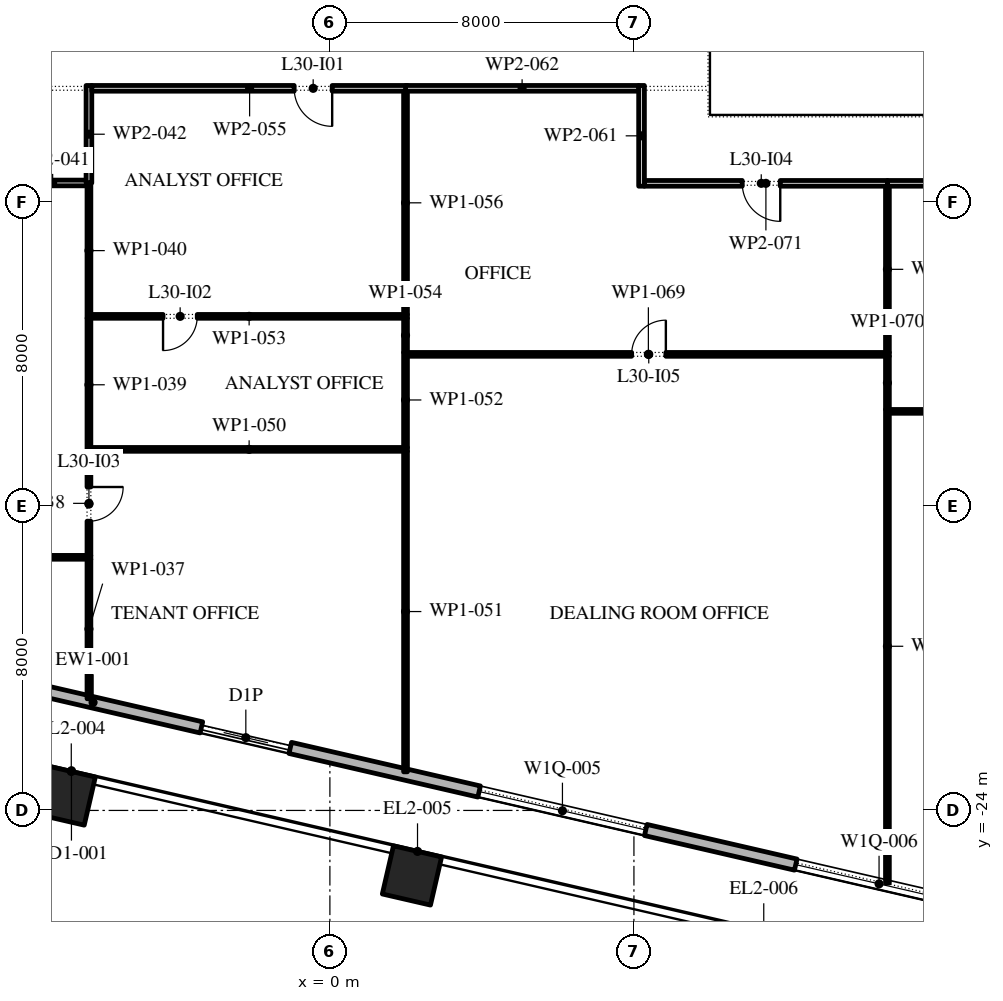
"""IFC4 building model, lengths in metres.
Left out: names, types, materials, properties, quantities, classifications, styles, units other than length and angle.
Written with IfcOpenShell. Run it as: python <this file> out.ifc"""

import sys

from ifc_helpers import new_model, si_unit, direction, frame, frame_2d, origin, origin_2d, place, context, subcontext, project, spatial, rectangle, extrude, element, fill, save


model = new_model("IFC4")
c1 = context("Model", 3, precision=1e-05, world=origin(), true_north=direction((0.0, 1.0)))
c2 = subcontext(c1, "Body", "Model", "MODEL_VIEW")
j1 = project(units=[si_unit("LENGTHUNIT", "METRE"), si_unit("PLANEANGLEUNIT", "RADIAN")], contexts=[c1])
p1 = place(None, origin())
s1 = spatial("IfcSite", under=j1, at=p1, CompositionType="ELEMENT")
p2 = place(p1, origin())
s2 = spatial("IfcBuilding", under=s1, at=p2, CompositionType="ELEMENT")
p3 = place(p2, frame((0.0, 0.0, 139.2)))
s3 = spatial("IfcBuildingStorey", under=s2, at=p3, CompositionType="ELEMENT", Elevation=139.2)
for number, where, z_axis, x_axis in (
    (1, (-6.951, -23.608, 0.0), (0.0, 0.0, 1.0), (0.974, -0.225, 0.0)),
    (2, (2.159, -25.711, 0.0), (0.0, 0.0, 1.0), (0.974, -0.225, 0.0)),
):
    element("IfcColumn", number, at=place(p3, frame(where, z_axis=z_axis, x_axis=x_axis)), inside=s3, PredefinedType="COLUMN", context=c2, shape_type="SweptSolid", body=[
        extrude(rectangle(XDim=1.3, YDim=1.3, at=origin_2d()), origin(), (0.0, 0.0, 1.0), 4.2),
    ])
p4 = place(p3, frame((-31.078, -15.421, 0.0), z_axis=(0.0, 0.0, 1.0), x_axis=(0.974370456532, -0.224949357493, 0.0)))
e3 = element("IfcWall", 3, at=p4, inside=s3, PredefinedType="STANDARD", context=c2, shape_type="SweptSolid", body=[
    extrude(rectangle(XDim=51.0, YDim=0.3, at=frame_2d((25.5, 0.0))), origin(), (0.0, 0.0, 1.0), 4.0),
])
p5 = place(p4, frame((1.875, 0.0, 0.45)))
e4 = element("IfcOpeningElement", 4, at=p5, cuts=e3, PredefinedType="OPENING", context=c2, shape_type="SweptSolid", body=[
    extrude(rectangle(XDim=4.5, YDim=2.65, at=frame_2d((2.25, 1.325))), frame((0.0, 0.16, 0.0), z_axis=(0.0, -1.0, 0.0), x_axis=(1.0, 0.0, 0.0)), (0.0, 0.0, 1.0), 0.32),
])
p6 = place(p4, frame((10.275, 0.0, 0.45)))
e5 = element("IfcOpeningElement", 5, at=p6, cuts=e3, PredefinedType="OPENING", context=c2, shape_type="SweptSolid", body=[
    extrude(rectangle(XDim=4.5, YDim=2.525, at=frame_2d((2.25, 1.262))), frame((0.0, 0.16, 0.0), z_axis=(0.0, -1.0, 0.0), x_axis=(1.0, 0.0, 0.0)), (0.0, 0.0, 1.0), 0.32),
])
p7 = place(p4, frame((18.825, 0.0, 0.45)))
e6 = element("IfcOpeningElement", 6, at=p7, cuts=e3, PredefinedType="OPENING", context=c2, shape_type="SweptSolid", body=[
    extrude(rectangle(XDim=4.5, YDim=2.5, at=frame_2d((2.25, 1.25))), frame((0.0, 0.16, 0.0), z_axis=(0.0, -1.0, 0.0), x_axis=(1.0, 0.0, 0.0)), (0.0, 0.0, 1.0), 0.32),
])
p8 = place(p4, frame((28.425, 0.0, 0.0)))
e7 = element("IfcOpeningElement", 7, at=p8, cuts=e3, PredefinedType="OPENING", context=c2, shape_type="SweptSolid", body=[
    extrude(rectangle(XDim=2.4, YDim=2.9, at=frame_2d((1.2, 1.45))), frame((0.0, 0.16, 0.0), z_axis=(0.0, -1.0, 0.0), x_axis=(1.0, 0.0, 0.0)), (0.0, 0.0, 1.0), 0.32),
])
p9 = place(p4, frame((35.925, 0.0, 0.45)))
e8 = element("IfcOpeningElement", 8, at=p9, cuts=e3, PredefinedType="OPENING", context=c2, shape_type="SweptSolid", body=[
    extrude(rectangle(XDim=4.5, YDim=2.45, at=frame_2d((2.25, 1.225))), frame((0.0, 0.16, 0.0), z_axis=(0.0, -1.0, 0.0), x_axis=(1.0, 0.0, 0.0)), (0.0, 0.0, 1.0), 0.32),
])
p10 = place(p4, frame((44.475, 0.0, 0.45)))
e9 = element("IfcOpeningElement", 9, at=p10, cuts=e3, PredefinedType="OPENING", context=c2, shape_type="SweptSolid", body=[
    extrude(rectangle(XDim=4.5, YDim=2.45, at=frame_2d((2.25, 1.225))), frame((0.0, 0.16, 0.0), z_axis=(0.0, -1.0, 0.0), x_axis=(1.0, 0.0, 0.0)), (0.0, 0.0, 1.0), 0.32),
])
p11 = place(p3, frame((-13.5, -17.34, 0.0), z_axis=(0.0, 0.0, 1.0), x_axis=(1.0, 0.0, 0.0)))
e10 = element("IfcWall", 10, at=p11, inside=s3, PredefinedType="PARTITIONING", context=c2, shape_type="SweptSolid", body=[
    extrude(rectangle(XDim=7.21, YDim=0.1, at=frame_2d((3.605, 0.0))), origin(), (0.0, 0.0, 1.0), 4.0),
])
p12 = place(p11, frame((1.7, 0.0, 0.0)))
e11 = element("IfcOpeningElement", 11, at=p12, cuts=e10, PredefinedType="OPENING", context=c2, shape_type="SweptSolid", body=[
    extrude(rectangle(XDim=0.9, YDim=2.1, at=frame_2d((0.45, 1.05))), frame((0.0, 0.06, 0.0), z_axis=(0.0, -1.0, 0.0), x_axis=(1.0, 0.0, 0.0)), (0.0, 0.0, 1.0), 0.12),
])
p13 = place(p3, frame((-6.34, -21.061, 0.0), z_axis=(0.0, 0.0, 1.0), x_axis=(0.0, 1.0, 0.0)))
e12 = element("IfcWall", 12, at=p13, inside=s3, PredefinedType="PARTITIONING", context=c2, shape_type="SweptSolid", body=[
    extrude(rectangle(XDim=3.671, YDim=0.1, at=frame_2d((1.835, 0.0))), origin(), (0.0, 0.0, 1.0), 4.0),
])
p14 = place(p3, frame((-6.34, -17.29, 0.0), z_axis=(0.0, 0.0, 1.0), x_axis=(0.0, 1.0, 0.0)))
e13 = element("IfcWall", 13, at=p14, inside=s3, PredefinedType="PARTITIONING", context=c2, shape_type="SweptSolid", body=[
    extrude(rectangle(XDim=2.74, YDim=0.1, at=frame_2d((1.37, 0.0))), origin(), (0.0, 0.0, 1.0), 4.0),
])
p15 = place(p14, frame((0.9, 0.0, 0.0)))
e14 = element("IfcOpeningElement", 14, at=p15, cuts=e13, PredefinedType="OPENING", context=c2, shape_type="SweptSolid", body=[
    extrude(rectangle(XDim=0.9, YDim=2.1, at=frame_2d((0.45, 1.05))), frame((0.0, 0.06, 0.0), z_axis=(0.0, -1.0, 0.0), x_axis=(1.0, 0.0, 0.0)), (0.0, 0.0, 1.0), 0.12),
])
p16 = place(p3, frame((-6.34, -14.55, 0.0), z_axis=(0.0, 0.0, 1.0), x_axis=(0.0, 1.0, 0.0)))
e15 = element("IfcWall", 15, at=p16, inside=s3, PredefinedType="PARTITIONING", context=c2, shape_type="SweptSolid", body=[
    extrude(rectangle(XDim=3.5, YDim=0.1, at=frame_2d((1.75, 0.0))), origin(), (0.0, 0.0, 1.0), 4.0),
])
p17 = place(p3, frame((-6.34, -11.05, 0.0), z_axis=(0.0, 0.0, 1.0), x_axis=(0.0, 1.0, 0.0)))
e16 = element("IfcWall", 16, at=p17, inside=s3, PredefinedType="PARTITIONING", context=c2, shape_type="SweptSolid", body=[
    extrude(rectangle(XDim=3.56, YDim=0.1, at=frame_2d((1.78, 0.0))), origin(), (0.0, 0.0, 1.0), 4.0),
])
p18 = place(p3, frame((-6.39, -7.49, 0.0), z_axis=(0.0, 0.0, 1.0), x_axis=(-1.0, 0.0, 0.0)))
e17 = element("IfcWall", 17, at=p18, inside=s3, PredefinedType="PARTITIONING", context=c2, shape_type="SweptSolid", body=[
    extrude(rectangle(XDim=1.81, YDim=0.15, at=frame_2d((0.905, 0.0))), origin(), (0.0, 0.0, 1.0), 4.0),
])
p19 = place(p3, frame((-6.34, -4.925, 0.0), z_axis=(0.0, 0.0, 1.0), x_axis=(0.0, -1.0, 0.0)))
e18 = element("IfcWall", 18, at=p19, inside=s3, PredefinedType="PARTITIONING", context=c2, shape_type="SweptSolid", body=[
    extrude(rectangle(XDim=2.565, YDim=0.15, at=frame_2d((1.282, 0.0))), origin(), (0.0, 0.0, 1.0), 4.0),
])
p20 = place(p3, frame((2.04, -14.5, 0.0), z_axis=(0.0, 0.0, 1.0), x_axis=(-1.0, 0.0, 0.0)))
e19 = element("IfcWall", 19, at=p20, inside=s3, PredefinedType="PARTITIONING", context=c2, shape_type="SweptSolid", body=[
    extrude(rectangle(XDim=8.33, YDim=0.1, at=frame_2d((4.165, 0.0))), origin(), (0.0, 0.0, 1.0), 4.0),
])
p21 = place(p3, frame((1.99, -14.55, 0.0), z_axis=(0.0, 0.0, 1.0), x_axis=(0.0, -1.0, 0.0)))
e20 = element("IfcWall", 20, at=p21, inside=s3, PredefinedType="PARTITIONING", context=c2, shape_type="SweptSolid", body=[
    extrude(rectangle(XDim=8.434, YDim=0.1, at=frame_2d((4.217, 0.0))), origin(), (0.0, 0.0, 1.0), 4.0),
])
p22 = place(p3, frame((1.99, -11.95, 0.0), z_axis=(0.0, 0.0, 1.0), x_axis=(0.0, -1.0, 0.0)))
e21 = element("IfcWall", 21, at=p22, inside=s3, PredefinedType="PARTITIONING", context=c2, shape_type="SweptSolid", body=[
    extrude(rectangle(XDim=2.5, YDim=0.1, at=frame_2d((1.25, 0.0))), origin(), (0.0, 0.0, 1.0), 4.0),
])
p23 = place(p3, frame((2.04, -11.0, 0.0), z_axis=(0.0, 0.0, 1.0), x_axis=(-1.0, 0.0, 0.0)))
e22 = element("IfcWall", 22, at=p23, inside=s3, PredefinedType="PARTITIONING", context=c2, shape_type="SweptSolid", body=[
    extrude(rectangle(XDim=8.33, YDim=0.1, at=frame_2d((4.165, 0.0))), origin(), (0.0, 0.0, 1.0), 4.0),
])
p24 = place(p23, frame((5.53, 0.0, 0.0)))
e23 = element("IfcOpeningElement", 23, at=p24, cuts=e22, PredefinedType="OPENING", context=c2, shape_type="SweptSolid", body=[
    extrude(rectangle(XDim=0.9, YDim=2.1, at=frame_2d((0.45, 1.05))), frame((0.0, 0.06, 0.0), z_axis=(0.0, -1.0, 0.0), x_axis=(1.0, 0.0, 0.0)), (0.0, 0.0, 1.0), 0.12),
])
p25 = place(p3, frame((1.99, -11.05, 0.0), z_axis=(0.0, 0.0, 1.0), x_axis=(0.0, -1.0, 0.0)))
e24 = element("IfcWall", 24, at=p25, inside=s3, PredefinedType="PARTITIONING", context=c2, shape_type="SweptSolid", body=[
    extrude(rectangle(XDim=0.9, YDim=0.1, at=frame_2d((0.45, 0.0))), origin(), (0.0, 0.0, 1.0), 4.0),
])
p26 = place(p3, frame((2.04, -5.0, 0.0), z_axis=(0.0, 0.0, 1.0), x_axis=(-1.0, 0.0, 0.0)))
e25 = element("IfcWall", 25, at=p26, inside=s3, PredefinedType="PARTITIONING", context=c2, shape_type="SweptSolid", body=[
    extrude(rectangle(XDim=8.305, YDim=0.15, at=frame_2d((4.152, 0.0))), origin(), (0.0, 0.0, 1.0), 4.0),
])
p27 = place(p26, frame((1.98, 0.0, 0.0)))
e26 = element("IfcOpeningElement", 26, at=p27, cuts=e25, PredefinedType="OPENING", context=c2, shape_type="SweptSolid", body=[
    extrude(rectangle(XDim=1.0, YDim=2.1, at=frame_2d((0.5, 1.05))), frame((0.0, 0.085, 0.0), z_axis=(0.0, -1.0, 0.0), x_axis=(1.0, 0.0, 0.0)), (0.0, 0.0, 1.0), 0.17),
])
p28 = place(p3, frame((1.99, -5.075, 0.0), z_axis=(0.0, 0.0, 1.0), x_axis=(0.0, -1.0, 0.0)))
e27 = element("IfcWall", 27, at=p28, inside=s3, PredefinedType="PARTITIONING", context=c2, shape_type="SweptSolid", body=[
    extrude(rectangle(XDim=5.875, YDim=0.1, at=frame_2d((2.938, 0.0))), origin(), (0.0, 0.0, 1.0), 4.0),
])
p29 = place(p3, frame((8.2, -7.575, 0.0), z_axis=(0.0, 0.0, 1.0), x_axis=(0.0, 1.0, 0.0)))
e28 = element("IfcWall", 28, at=p29, inside=s3, PredefinedType="PARTITIONING", context=c2, shape_type="SweptSolid", body=[
    extrude(rectangle(XDim=2.65, YDim=0.15, at=frame_2d((1.325, 0.0))), origin(), (0.0, 0.0, 1.0), 4.0),
])
p30 = place(p3, frame((8.125, -5.0, 0.0), z_axis=(0.0, 0.0, 1.0), x_axis=(-1.0, 0.0, 0.0)))
e29 = element("IfcWall", 29, at=p30, inside=s3, PredefinedType="PARTITIONING", context=c2, shape_type="SweptSolid", body=[
    extrude(rectangle(XDim=6.135, YDim=0.15, at=frame_2d((3.067, 0.0))), origin(), (0.0, 0.0, 1.0), 4.0),
])
p31 = place(p3, frame((14.67, -13.45, 0.0), z_axis=(0.0, 0.0, 1.0), x_axis=(0.0, -1.0, 0.0)))
e30 = element("IfcWall", 30, at=p31, inside=s3, PredefinedType="PARTITIONING", context=c2, shape_type="SweptSolid", body=[
    extrude(rectangle(XDim=12.461, YDim=0.1, at=frame_2d((6.23, 0.0))), origin(), (0.0, 0.0, 1.0), 4.0),
])
p32 = place(p3, frame((14.72, -12.0, 0.0), z_axis=(0.0, 0.0, 1.0), x_axis=(-1.0, 0.0, 0.0)))
e31 = element("IfcWall", 31, at=p32, inside=s3, PredefinedType="PARTITIONING", context=c2, shape_type="SweptSolid", body=[
    extrude(rectangle(XDim=12.68, YDim=0.1, at=frame_2d((6.34, 0.0))), origin(), (0.0, 0.0, 1.0), 4.0),
])
p33 = place(p32, frame((5.88, 0.0, 0.0)))
e32 = element("IfcOpeningElement", 32, at=p33, cuts=e31, PredefinedType="OPENING", context=c2, shape_type="SweptSolid", body=[
    extrude(rectangle(XDim=0.9, YDim=2.1, at=frame_2d((0.45, 1.05))), frame((0.0, 0.06, 0.0), z_axis=(0.0, -1.0, 0.0), x_axis=(1.0, 0.0, 0.0)), (0.0, 0.0, 1.0), 0.12),
])
p34 = place(p3, frame((14.67, -12.05, 0.0), z_axis=(0.0, 0.0, 1.0), x_axis=(0.0, -1.0, 0.0)))
e33 = element("IfcWall", 33, at=p34, inside=s3, PredefinedType="PARTITIONING", context=c2, shape_type="SweptSolid", body=[
    extrude(rectangle(XDim=1.4, YDim=0.1, at=frame_2d((0.7, 0.0))), origin(), (0.0, 0.0, 1.0), 4.0),
])
p35 = place(p3, frame((14.67, -7.5, 0.0), z_axis=(0.0, 0.0, 1.0), x_axis=(-1.0, 0.0, 0.0)))
e34 = element("IfcWall", 34, at=p35, inside=s3, PredefinedType="PARTITIONING", context=c2, shape_type="SweptSolid", body=[
    extrude(rectangle(XDim=6.395, YDim=0.15, at=frame_2d((3.198, 0.0))), origin(), (0.0, 0.0, 1.0), 4.0),
])
p36 = place(p35, frame((2.82, 0.0, 0.0)))
e35 = element("IfcOpeningElement", 35, at=p36, cuts=e34, PredefinedType="OPENING", context=c2, shape_type="SweptSolid", body=[
    extrude(rectangle(XDim=1.0, YDim=2.1, at=frame_2d((0.5, 1.05))), frame((0.0, 0.085, 0.0), z_axis=(0.0, -1.0, 0.0), x_axis=(1.0, 0.0, 0.0)), (0.0, 0.0, 1.0), 0.17),
])
p37 = place(p3, frame((14.67, -7.575, 0.0), z_axis=(0.0, 0.0, 1.0), x_axis=(0.0, -1.0, 0.0)))
e36 = element("IfcWall", 36, at=p37, inside=s3, PredefinedType="PARTITIONING", context=c2, shape_type="SweptSolid", body=[
    extrude(rectangle(XDim=4.375, YDim=0.1, at=frame_2d((2.188, 0.0))), origin(), (0.0, 0.0, 1.0), 4.0),
])
p38 = place(p3, frame((23.06, -13.5, 0.0), z_axis=(0.0, 0.0, 1.0), x_axis=(-1.0, 0.0, 0.0)))
e37 = element("IfcWall", 37, at=p38, inside=s3, PredefinedType="PARTITIONING", context=c2, shape_type="SweptSolid", body=[
    extrude(rectangle(XDim=8.34, YDim=0.1, at=frame_2d((4.17, 0.0))), origin(), (0.0, 0.0, 1.0), 4.0),
])
p39 = place(p38, frame((2.04, 0.0, 0.0)))
e38 = element("IfcOpeningElement", 38, at=p39, cuts=e37, PredefinedType="OPENING", context=c2, shape_type="SweptSolid", body=[
    extrude(rectangle(XDim=0.9, YDim=2.1, at=frame_2d((0.45, 1.05))), frame((0.0, 0.06, 0.0), z_axis=(0.0, -1.0, 0.0), x_axis=(1.0, 0.0, 0.0)), (0.0, 0.0, 1.0), 0.12),
])
p40 = place(p3, frame((23.06, -7.5, 0.0), z_axis=(0.0, 0.0, 1.0), x_axis=(-1.0, 0.0, 0.0)))
e39 = element("IfcWall", 39, at=p40, inside=s3, PredefinedType="PARTITIONING", context=c2, shape_type="SweptSolid", body=[
    extrude(rectangle(XDim=8.39, YDim=0.15, at=frame_2d((4.195, 0.0))), origin(), (0.0, 0.0, 1.0), 4.0),
])
p41 = place(p40, frame((1.99, 0.0, 0.0)))
e40 = element("IfcOpeningElement", 40, at=p41, cuts=e39, PredefinedType="OPENING", context=c2, shape_type="SweptSolid", body=[
    extrude(rectangle(XDim=1.0, YDim=2.1, at=frame_2d((0.5, 1.05))), frame((0.0, 0.085, 0.0), z_axis=(0.0, -1.0, 0.0), x_axis=(1.0, 0.0, 0.0)), (0.0, 0.0, 1.0), 0.17),
])
p42 = place(p8, origin())
e41 = element("IfcDoor", 41, at=p42, inside=s3, OperationType="DOUBLE_DOOR_SLIDING", PredefinedType="DOOR", context=c2, shape_type="SweptSolid", body=[
    extrude(rectangle(XDim=2.4, YDim=2.9, at=frame_2d((1.2, 1.45))), frame((0.0, 0.025, 0.0), z_axis=(0.0, -1.0, 0.0), x_axis=(1.0, 0.0, 0.0)), (0.0, 0.0, 1.0), 0.05),
])
fill(e7, e41)
p43 = place(p9, origin())
e42 = element("IfcWindow", 42, at=p43, inside=s3, PartitioningType="DOUBLE_PANEL_VERTICAL", PredefinedType="WINDOW", context=c2, shape_type="SweptSolid", body=[
    extrude(rectangle(XDim=4.5, YDim=2.45, at=frame_2d((2.25, 1.225))), frame((0.0, 0.03, 0.0), z_axis=(0.0, -1.0, 0.0), x_axis=(1.0, 0.0, 0.0)), (0.0, 0.0, 1.0), 0.06),
])
fill(e8, e42)
p44 = place(p10, origin())
e43 = element("IfcWindow", 43, at=p44, inside=s3, PartitioningType="DOUBLE_PANEL_VERTICAL", PredefinedType="WINDOW", context=c2, shape_type="SweptSolid", body=[
    extrude(rectangle(XDim=4.5, YDim=2.45, at=frame_2d((2.25, 1.225))), frame((0.0, 0.03, 0.0), z_axis=(0.0, -1.0, 0.0), x_axis=(1.0, 0.0, 0.0)), (0.0, 0.0, 1.0), 0.06),
])
fill(e9, e43)
p45 = place(p27, origin())
e44 = element("IfcDoor", 44, at=p45, inside=s3, OperationType="SINGLE_SWING_RIGHT", PredefinedType="DOOR", context=c2, shape_type="SweptSolid", body=[
    extrude(rectangle(XDim=1.0, YDim=2.1, at=frame_2d((0.5, 1.05))), frame((0.0, 0.025, 0.0), z_axis=(0.0, -1.0, 0.0), x_axis=(1.0, 0.0, 0.0)), (0.0, 0.0, 1.0), 0.05),
])
fill(e26, e44)
p46 = place(p24, origin())
e45 = element("IfcDoor", 45, at=p46, inside=s3, OperationType="SINGLE_SWING_LEFT", PredefinedType="DOOR", context=c2, shape_type="SweptSolid", body=[
    extrude(rectangle(XDim=0.9, YDim=2.1, at=frame_2d((0.45, 1.05))), frame((0.0, 0.025, 0.0), z_axis=(0.0, -1.0, 0.0), x_axis=(1.0, 0.0, 0.0)), (0.0, 0.0, 1.0), 0.05),
])
fill(e23, e45)
p47 = place(p15, frame((0.9, 0.0, 0.0), z_axis=(0.0, 0.0, 1.0), x_axis=(-1.0, 0.0, 0.0)))
e46 = element("IfcDoor", 46, at=p47, inside=s3, OperationType="SINGLE_SWING_RIGHT", PredefinedType="DOOR", context=c2, shape_type="SweptSolid", body=[
    extrude(rectangle(XDim=0.9, YDim=2.1, at=frame_2d((0.45, 1.05))), frame((0.0, 0.025, 0.0), z_axis=(0.0, -1.0, 0.0), x_axis=(1.0, 0.0, 0.0)), (0.0, 0.0, 1.0), 0.05),
])
fill(e14, e46)
p48 = place(p36, origin())
e47 = element("IfcDoor", 47, at=p48, inside=s3, OperationType="SINGLE_SWING_RIGHT", PredefinedType="DOOR", context=c2, shape_type="SweptSolid", body=[
    extrude(rectangle(XDim=1.0, YDim=2.1, at=frame_2d((0.5, 1.05))), frame((0.0, 0.025, 0.0), z_axis=(0.0, -1.0, 0.0), x_axis=(1.0, 0.0, 0.0)), (0.0, 0.0, 1.0), 0.05),
])
fill(e35, e47)
p49 = place(p33, frame((0.9, 0.0, 0.0), z_axis=(0.0, 0.0, 1.0), x_axis=(-1.0, 0.0, 0.0)))
e48 = element("IfcDoor", 48, at=p49, inside=s3, OperationType="SINGLE_SWING_LEFT", PredefinedType="DOOR", context=c2, shape_type="SweptSolid", body=[
    extrude(rectangle(XDim=0.9, YDim=2.1, at=frame_2d((0.45, 1.05))), frame((0.0, 0.025, 0.0), z_axis=(0.0, -1.0, 0.0), x_axis=(1.0, 0.0, 0.0)), (0.0, 0.0, 1.0), 0.05),
])
fill(e32, e48)
save(model, sys.argv[1])
